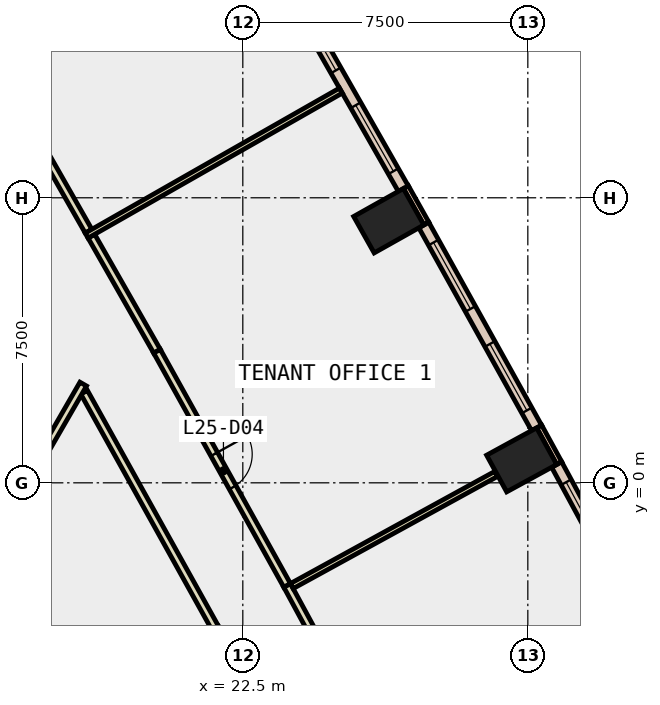
"""IFC4 building model, lengths in metres.
Left out: names, types, materials, properties, quantities, classifications, styles, units other than length and angle.
Written with IfcOpenShell. Run it as: python <this file> out.ifc"""

import sys

from ifc_helpers import new_model, si_unit, direction, frame, frame_2d, origin, origin_2d, place, context, subcontext, project, spatial, rectangle, extrude, element, fill, save


model = new_model("IFC4")
c1 = context("Model", 3, precision=1e-05, world=origin(), true_north=direction((0.0, 1.0)))
c2 = subcontext(c1, "Body", "Model", "MODEL_VIEW")
j1 = project(units=[si_unit("LENGTHUNIT", "METRE"), si_unit("PLANEANGLEUNIT", "RADIAN")], contexts=[c1])
p1 = place(None, origin())
s1 = spatial("IfcSite", under=j1, at=p1, CompositionType="ELEMENT")
p2 = place(p1, origin())
s2 = spatial("IfcBuilding", under=s1, at=p2, CompositionType="ELEMENT")
p3 = place(p2, frame((0.0, 0.0, 116.0)))
s3 = spatial("IfcBuildingStorey", under=s2, at=p3, CompositionType="ELEMENT", Elevation=116.0)
for number, where, z_axis, x_axis in (
    (1, (29.838, 0.604, -0.4), (0.0, 0.0, 1.0), (-0.48, 0.877, 0.0)),
    (2, (26.341, 6.896, -0.4), (0.0, 0.0, 1.0), (-0.49, 0.872, 0.0)),
):
    element("IfcColumn", number, at=place(p3, frame(where, z_axis=z_axis, x_axis=x_axis)), inside=s3, PredefinedType="COLUMN", context=c2, shape_type="SweptSolid", body=[
        extrude(rectangle(XDim=1.1, YDim=1.5, at=origin_2d()), origin(), (0.0, 0.0, 1.0), 4.2),
    ])
p4 = place(p3, frame((30.826, 0.517, 0.0), z_axis=(0.0, 0.0, 1.0), x_axis=(-0.479566870346, 0.877505337229, 0.0)))
e3 = element("IfcWall", 3, at=p4, inside=s3, PredefinedType="STANDARD", context=c2, shape_type="SweptSolid", body=[
    extrude(rectangle(XDim=1.101, YDim=0.15, at=frame_2d((0.55, 0.0))), origin(), (0.0, 0.0, 1.0), 3.8),
])
p5 = place(p3, frame((27.33, 6.821, 0.0), z_axis=(0.0, 0.0, 1.0), x_axis=(-0.490008344094, 0.871717742574, 0.0)))
e4 = element("IfcWall", 4, at=p5, inside=s3, PredefinedType="STANDARD", context=c2, shape_type="SweptSolid", body=[
    extrude(rectangle(XDim=1.1, YDim=0.15, at=frame_2d((0.55, 0.0))), origin(), (0.0, 0.0, 1.0), 3.8),
])
p6 = place(p3, frame((33.667, -4.892, 0.0), z_axis=(0.0, 0.0, 1.0), x_axis=(-0.476097776444, 0.879392351152, 0.0)))
e5 = element("IfcWall", 5, at=p6, inside=s3, PredefinedType="STANDARD", context=c2, shape_type="SweptSolid", body=[
    extrude(rectangle(XDim=6.11, YDim=0.3, at=frame_2d((3.055, 0.0))), origin(), (0.0, 0.0, 1.0), 3.8),
])
p7 = place(p6, frame((0.527, 0.0, 0.9)))
e6 = element("IfcOpeningElement", 6, at=p7, cuts=e5, PredefinedType="OPENING", context=c2, shape_type="SweptSolid", body=[
    extrude(rectangle(XDim=2.0, YDim=2.6, at=frame_2d((1.0, 1.3))), frame((0.0, 0.16, 0.0), z_axis=(0.0, -1.0, 0.0), x_axis=(1.0, 0.0, 0.0)), (0.0, 0.0, 1.0), 0.32),
])
p8 = place(p6, frame((3.582, 0.0, 0.9)))
e7 = element("IfcOpeningElement", 7, at=p8, cuts=e5, PredefinedType="OPENING", context=c2, shape_type="SweptSolid", body=[
    extrude(rectangle(XDim=2.0, YDim=2.6, at=frame_2d((1.0, 1.3))), frame((0.0, 0.16, 0.0), z_axis=(0.0, -1.0, 0.0), x_axis=(1.0, 0.0, 0.0)), (0.0, 0.0, 1.0), 0.32),
])
p9 = place(p3, frame((30.23, 1.444, 0.0), z_axis=(0.0, 0.0, 1.0), x_axis=(-0.485822751649, 0.874057351654, 0.0)))
e8 = element("IfcWall", 8, at=p9, inside=s3, PredefinedType="STANDARD", context=c2, shape_type="SweptSolid", body=[
    extrude(rectangle(XDim=6.109, YDim=0.3, at=frame_2d((3.055, 0.0))), origin(), (0.0, 0.0, 1.0), 3.8),
])
p10 = place(p9, frame((0.527, 0.0, 0.9)))
e9 = element("IfcOpeningElement", 9, at=p10, cuts=e8, PredefinedType="OPENING", context=c2, shape_type="SweptSolid", body=[
    extrude(rectangle(XDim=2.0, YDim=2.6, at=frame_2d((1.0, 1.3))), frame((0.0, 0.16, 0.0), z_axis=(0.0, -1.0, 0.0), x_axis=(1.0, 0.0, 0.0)), (0.0, 0.0, 1.0), 0.32),
])
p11 = place(p9, frame((3.582, 0.0, 0.9)))
e10 = element("IfcOpeningElement", 10, at=p11, cuts=e8, PredefinedType="OPENING", context=c2, shape_type="SweptSolid", body=[
    extrude(rectangle(XDim=2.0, YDim=2.6, at=frame_2d((1.0, 1.3))), frame((0.0, 0.16, 0.0), z_axis=(0.0, -1.0, 0.0), x_axis=(1.0, 0.0, 0.0)), (0.0, 0.0, 1.0), 0.32),
])
p12 = place(p3, frame((26.723, 7.74, 0.0), z_axis=(0.0, 0.0, 1.0), x_axis=(-0.495114366991, 0.868827810098, 0.0)))
e11 = element("IfcWall", 11, at=p12, inside=s3, PredefinedType="STANDARD", context=c2, shape_type="SweptSolid", body=[
    extrude(rectangle(XDim=6.11, YDim=0.3, at=frame_2d((3.055, 0.0))), origin(), (0.0, 0.0, 1.0), 3.8),
])
p13 = place(p12, frame((0.527, 0.0, 0.9)))
e12 = element("IfcOpeningElement", 12, at=p13, cuts=e11, PredefinedType="OPENING", context=c2, shape_type="SweptSolid", body=[
    extrude(rectangle(XDim=2.0, YDim=2.6, at=frame_2d((1.0, 1.3))), frame((0.0, 0.16, 0.0), z_axis=(0.0, -1.0, 0.0), x_axis=(1.0, 0.0, 0.0)), (0.0, 0.0, 1.0), 0.32),
])
p14 = place(p12, frame((3.582, 0.0, 0.9)))
e13 = element("IfcOpeningElement", 13, at=p14, cuts=e11, PredefinedType="OPENING", context=c2, shape_type="SweptSolid", body=[
    extrude(rectangle(XDim=2.0, YDim=2.6, at=frame_2d((1.0, 1.3))), frame((0.0, 0.16, 0.0), z_axis=(0.0, -1.0, 0.0), x_axis=(1.0, 0.0, 0.0)), (0.0, 0.0, 1.0), 0.32),
])
p15 = place(p3, frame((21.773, -3.822, 0.0), z_axis=(0.0, 0.0, 1.0), x_axis=(-0.485826874234, 0.874055060206, 0.0)))
e14 = element("IfcWall", 14, at=p15, inside=s3, PredefinedType="PARTITIONING", context=c2, shape_type="SweptSolid", body=[
    extrude(rectangle(XDim=7.099, YDim=0.2, at=frame_2d((3.55, 0.0))), origin(), (0.0, 0.0, 1.0), 3.8),
])
p16 = place(p3, frame((23.666, -2.698, 0.0), z_axis=(0.0, 0.0, 1.0), x_axis=(0.476195741963, -0.879339306148, 0.0)))
e15 = element("IfcWall", 15, at=p16, inside=s3, PredefinedType="PARTITIONING", context=c2, shape_type="SweptSolid", body=[
    extrude(rectangle(XDim=7.199, YDim=0.2, at=frame_2d((3.599, 0.0))), origin(), (0.0, 0.0, 1.0), 3.8),
])
p17 = place(p16, frame((3.099, 0.0, 0.0)))
e16 = element("IfcOpeningElement", 16, at=p17, cuts=e15, PredefinedType="OPENING", context=c2, shape_type="SweptSolid", body=[
    extrude(rectangle(XDim=1.0, YDim=2.1, at=frame_2d((0.5, 1.05))), frame((0.0, 0.11, 0.0), z_axis=(0.0, -1.0, 0.0), x_axis=(1.0, 0.0, 0.0)), (0.0, 0.0, 1.0), 0.22),
])
p18 = place(p3, frame((18.515, 6.491, 0.0), z_axis=(0.0, 0.0, 1.0), x_axis=(0.495309264725, -0.868716715781, 0.0)))
e17 = element("IfcWall", 17, at=p18, inside=s3, PredefinedType="PARTITIONING", context=c2, shape_type="SweptSolid", body=[
    extrude(rectangle(XDim=3.487, YDim=0.2, at=frame_2d((1.743, 0.0))), origin(), (0.0, 0.0, 1.0), 3.8),
])
p19 = place(p3, frame((20.242, 3.462, 0.0), z_axis=(0.0, 0.0, 1.0), x_axis=(0.485742937917, -0.874101709336, 0.0)))
e18 = element("IfcWall", 18, at=p19, inside=s3, PredefinedType="PARTITIONING", context=c2, shape_type="SweptSolid", body=[
    extrude(rectangle(XDim=7.047, YDim=0.2, at=frame_2d((3.523, 0.0))), origin(), (0.0, 0.0, 1.0), 3.8),
])
p20 = place(p19, frame((3.099, 0.0, 0.0)))
e19 = element("IfcOpeningElement", 19, at=p20, cuts=e18, PredefinedType="OPENING", context=c2, shape_type="SweptSolid", body=[
    extrude(rectangle(XDim=1.0, YDim=2.1, at=frame_2d((0.5, 1.05))), frame((0.0, 0.11, 0.0), z_axis=(0.0, -1.0, 0.0), x_axis=(1.0, 0.0, 0.0)), (0.0, 0.0, 1.0), 0.22),
])
p21 = place(p3, frame((16.714, 9.65, 0.0), z_axis=(0.0, 0.0, 1.0), x_axis=(0.495286549488, -0.868729666753, 0.0)))
e20 = element("IfcWall", 20, at=p21, inside=s3, PredefinedType="PARTITIONING", context=c2, shape_type="SweptSolid", body=[
    extrude(rectangle(XDim=3.487, YDim=0.2, at=frame_2d((1.743, 0.0))), origin(), (0.0, 0.0, 1.0), 3.8),
])
p22 = place(p3, frame((18.301, 2.598, 0.0), z_axis=(0.0, 0.0, 1.0), x_axis=(-0.49997732567, -0.866038494419, 0.0)))
e21 = element("IfcWall", 21, at=p22, inside=s3, PredefinedType="PARTITIONING", context=c2, shape_type="SweptSolid", body=[
    extrude(rectangle(XDim=11.0, YDim=0.2, at=frame_2d((5.5, 0.0))), origin(), (0.0, 0.0, 1.0), 3.8),
])
p23 = place(p3, frame((23.789, -2.716, 0.0), z_axis=(0.0, 0.0, 1.0), x_axis=(0.876716532234, 0.481007403382, 0.0)))
e22 = element("IfcWall", 22, at=p23, inside=s3, PredefinedType="PARTITIONING", context=c2, shape_type="SweptSolid", body=[
    extrude(rectangle(XDim=6.131, YDim=0.15, at=frame_2d((3.065, 0.0))), origin(), (0.0, 0.0, 1.0), 3.8),
])
p24 = place(p3, frame((18.391, 6.506, 0.0), z_axis=(0.0, 0.0, 1.0), x_axis=(0.868738258528, 0.495271479261, 0.0)))
e23 = element("IfcWall", 23, at=p24, inside=s3, PredefinedType="PARTITIONING", context=c2, shape_type="SweptSolid", body=[
    extrude(rectangle(XDim=7.701, YDim=0.15, at=frame_2d((3.85, 0.0))), origin(), (0.0, 0.0, 1.0), 3.8),
])
p25 = place(p8, origin())
e24 = element("IfcWindow", 24, at=p25, inside=s3, PartitioningType="SINGLE_PANEL", PredefinedType="WINDOW", context=c2, shape_type="SweptSolid", body=[
    extrude(rectangle(XDim=2.0, YDim=2.6, at=frame_2d((1.0, 1.3))), frame((0.0, 0.03, 0.0), z_axis=(0.0, -1.0, 0.0), x_axis=(1.0, 0.0, 0.0)), (0.0, 0.0, 1.0), 0.06),
])
fill(e7, e24)
p26 = place(p10, origin())
e25 = element("IfcWindow", 25, at=p26, inside=s3, PartitioningType="SINGLE_PANEL", PredefinedType="WINDOW", context=c2, shape_type="SweptSolid", body=[
    extrude(rectangle(XDim=2.0, YDim=2.6, at=frame_2d((1.0, 1.3))), frame((0.0, 0.03, 0.0), z_axis=(0.0, -1.0, 0.0), x_axis=(1.0, 0.0, 0.0)), (0.0, 0.0, 1.0), 0.06),
])
fill(e9, e25)
p27 = place(p11, origin())
e26 = element("IfcWindow", 26, at=p27, inside=s3, PartitioningType="SINGLE_PANEL", PredefinedType="WINDOW", context=c2, shape_type="SweptSolid", body=[
    extrude(rectangle(XDim=2.0, YDim=2.6, at=frame_2d((1.0, 1.3))), frame((0.0, 0.03, 0.0), z_axis=(0.0, -1.0, 0.0), x_axis=(1.0, 0.0, 0.0)), (0.0, 0.0, 1.0), 0.06),
])
fill(e10, e26)
p28 = place(p13, origin())
e27 = element("IfcWindow", 27, at=p28, inside=s3, PartitioningType="SINGLE_PANEL", PredefinedType="WINDOW", context=c2, shape_type="SweptSolid", body=[
    extrude(rectangle(XDim=2.0, YDim=2.6, at=frame_2d((1.0, 1.3))), frame((0.0, 0.03, 0.0), z_axis=(0.0, -1.0, 0.0), x_axis=(1.0, 0.0, 0.0)), (0.0, 0.0, 1.0), 0.06),
])
fill(e12, e27)
p29 = place(p14, origin())
e28 = element("IfcWindow", 28, at=p29, inside=s3, PartitioningType="SINGLE_PANEL", PredefinedType="WINDOW", context=c2, shape_type="SweptSolid", body=[
    extrude(rectangle(XDim=2.0, YDim=2.6, at=frame_2d((1.0, 1.3))), frame((0.0, 0.03, 0.0), z_axis=(0.0, -1.0, 0.0), x_axis=(1.0, 0.0, 0.0)), (0.0, 0.0, 1.0), 0.06),
])
fill(e13, e28)
p30 = place(p20, origin())
e29 = element("IfcDoor", 29, at=p30, inside=s3, OperationType="SINGLE_SWING_LEFT", PredefinedType="DOOR", context=c2, shape_type="SweptSolid", body=[
    extrude(rectangle(XDim=1.0, YDim=2.1, at=frame_2d((0.5, 1.05))), frame((0.0, 0.025, 0.0), z_axis=(0.0, -1.0, 0.0), x_axis=(1.0, 0.0, 0.0)), (0.0, 0.0, 1.0), 0.05),
])
fill(e19, e29)
save(model, sys.argv[1])
